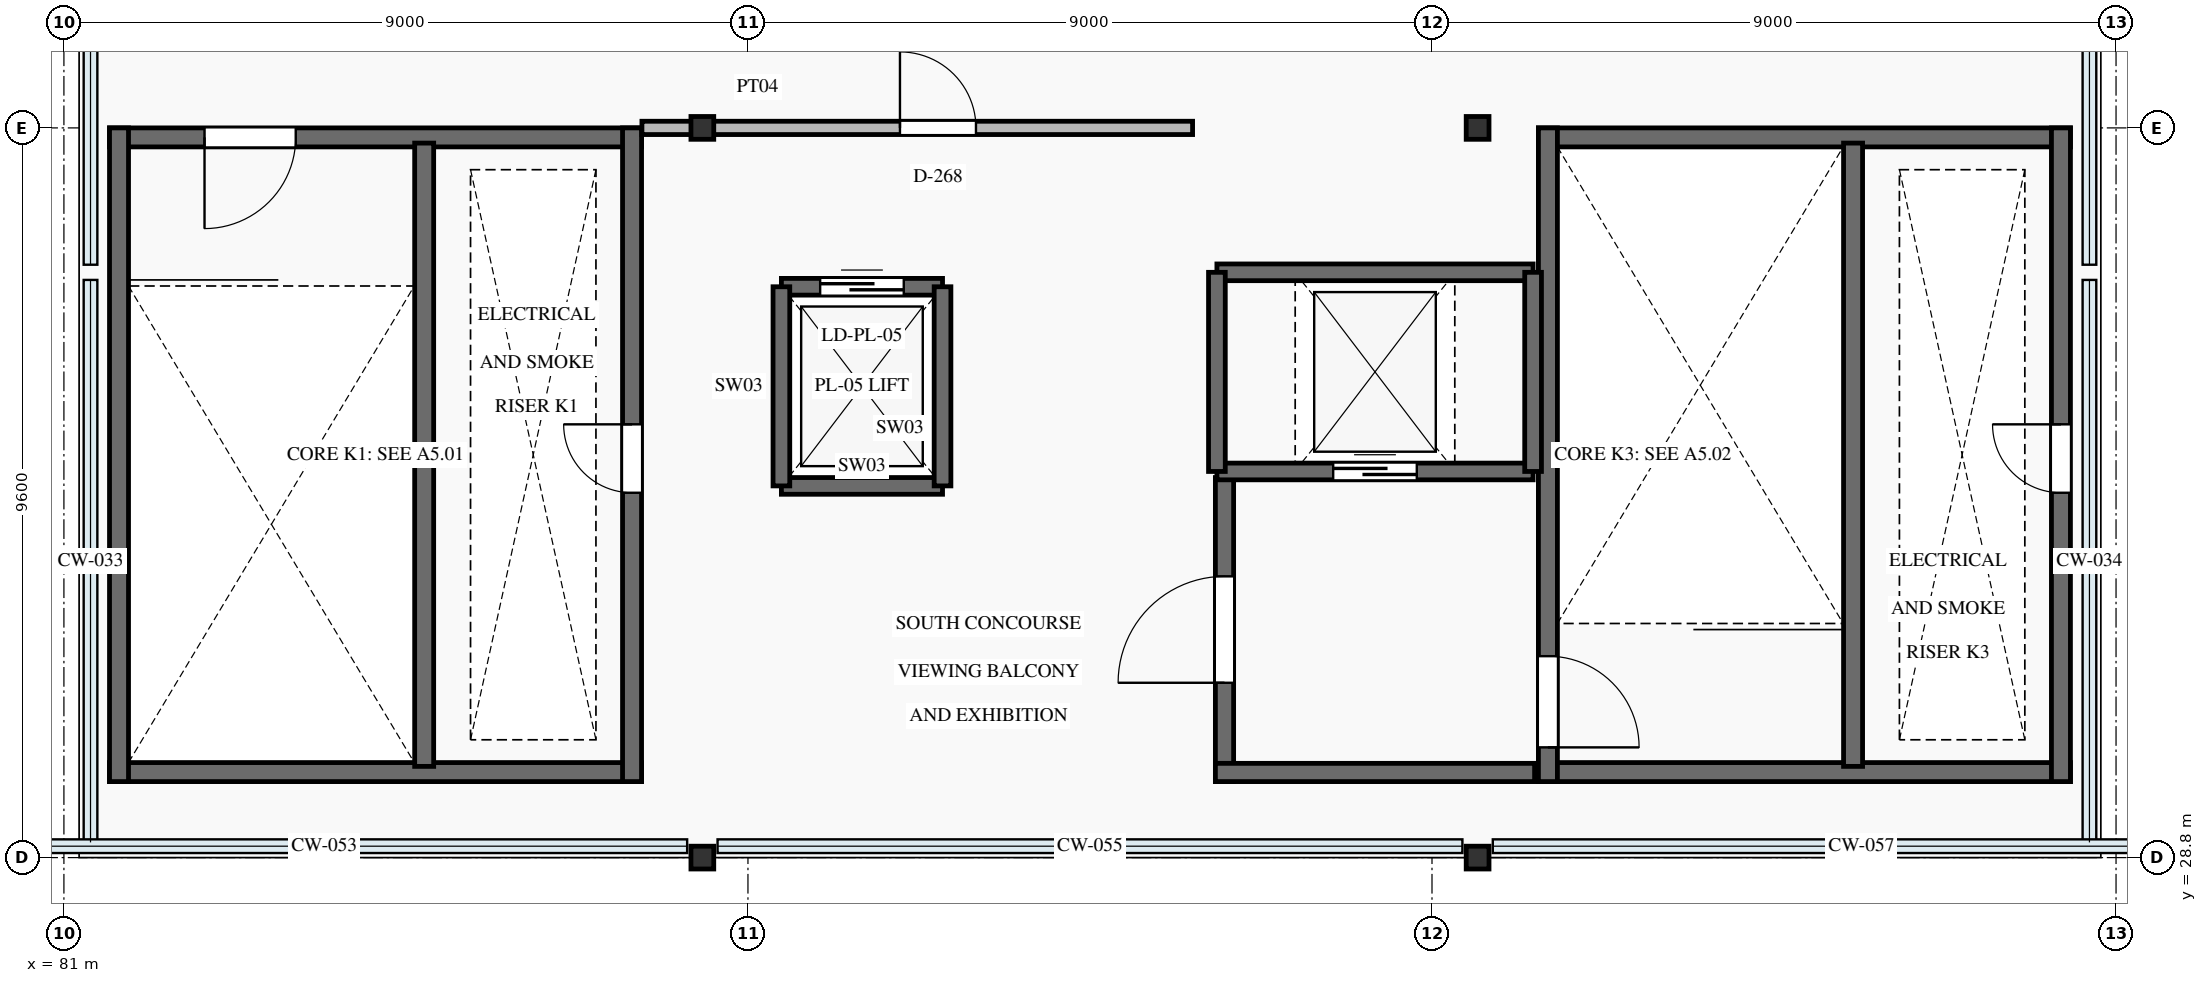
"""IFC4 building model, lengths in metres.
Left out: names, types, materials, properties, quantities, classifications, styles, units other than length and angle.
Written with IfcOpenShell. Run it as: python <this file> out.ifc"""

import sys

from ifc_helpers import new_model, si_unit, direction, frame, frame_2d, origin, origin_2d, place, context, subcontext, project, spatial, rectangle, i_section, extrude, element, fill, save


model = new_model("IFC4")
c1 = context("Model", 3, precision=1e-05, world=origin(), true_north=direction((0.0, 1.0)))
c2 = subcontext(c1, "Body", "Model", "MODEL_VIEW")
j1 = project(units=[si_unit("LENGTHUNIT", "METRE"), si_unit("PLANEANGLEUNIT", "RADIAN")], contexts=[c1])
p1 = place(None, origin())
s1 = spatial("IfcSite", under=j1, at=p1, CompositionType="ELEMENT")
p2 = place(p1, origin())
s2 = spatial("IfcBuilding", under=s1, at=p2, CompositionType="ELEMENT")
p3 = place(p2, frame((0.0, 0.0, 15.0)))
s3 = spatial("IfcBuildingStorey", under=s2, at=p3, CompositionType="ELEMENT", Elevation=15.0)
for number, where, z_axis, x_axis in (
    (1, (89.4, 28.8, 0.0), (0.0, 0.0, 1.0), (1.0, 0.0, 0.0)),
    (2, (89.4, 38.4, 0.0), (0.0, 0.0, 1.0), (1.0, 0.0, 0.0)),
    (3, (99.6, 28.8, 0.0), (0.0, 0.0, 1.0), (1.0, 0.0, 0.0)),
    (4, (99.6, 38.4, 0.0), (0.0, 0.0, 1.0), (1.0, 0.0, 0.0)),
):
    element("IfcColumn", number, at=place(p3, frame(where, z_axis=z_axis, x_axis=x_axis)), inside=s3, PredefinedType="COLUMN", context=c2, shape_type="SweptSolid", body=[
        extrude(i_section(OverallWidth=0.3, OverallDepth=0.3, WebThickness=0.011, FlangeThickness=0.019, FilletRadius=0.027, at=origin_2d()), origin(), (0.0, 0.0, 1.0), 3.9),
    ])
p4 = place(p3, frame((81.6, 29.925, 0.0), z_axis=(0.0, 0.0, 1.0), x_axis=(1.0, 0.0, 0.0)))
e5 = element("IfcWall", 5, at=p4, inside=s3, PredefinedType="SHEAR", context=c2, shape_type="SweptSolid", body=[
    extrude(rectangle(XDim=7.0, YDim=0.25, at=frame_2d((3.5, 0.0))), origin(), (0.0, 0.0, 1.0), 3.9),
])
p5 = place(p3, frame((81.6, 38.275, 0.0), z_axis=(0.0, 0.0, 1.0), x_axis=(1.0, 0.0, 0.0)))
e6 = element("IfcWall", 6, at=p5, inside=s3, PredefinedType="SHEAR", context=c2, shape_type="SweptSolid", body=[
    extrude(rectangle(XDim=7.0, YDim=0.25, at=frame_2d((3.5, 0.0))), origin(), (0.0, 0.0, 1.0), 3.9),
])
p6 = place(p5, frame((1.25, 0.0, 0.0)))
e7 = element("IfcOpeningElement", 7, at=p6, cuts=e6, PredefinedType="OPENING", context=c2, shape_type="SweptSolid", body=[
    extrude(rectangle(XDim=1.2, YDim=2.15, at=frame_2d((0.6, 1.075))), frame((0.0, 0.14, 0.0), z_axis=(0.0, -1.0, 0.0), x_axis=(1.0, 0.0, 0.0)), (0.0, 0.0, 1.0), 0.28),
])
p7 = place(p3, frame((81.725, 29.8, 0.0), z_axis=(0.0, 0.0, 1.0), x_axis=(0.0, 1.0, 0.0)))
e8 = element("IfcWall", 8, at=p7, inside=s3, PredefinedType="SHEAR", context=c2, shape_type="SweptSolid", body=[
    extrude(rectangle(XDim=8.6, YDim=0.25, at=frame_2d((4.3, 0.0))), origin(), (0.0, 0.0, 1.0), 3.9),
])
p8 = place(p3, frame((88.475, 29.8, 0.0), z_axis=(0.0, 0.0, 1.0), x_axis=(0.0, 1.0, 0.0)))
e9 = element("IfcWall", 9, at=p8, inside=s3, PredefinedType="SHEAR", context=c2, shape_type="SweptSolid", body=[
    extrude(rectangle(XDim=8.6, YDim=0.25, at=frame_2d((4.3, 0.0))), origin(), (0.0, 0.0, 1.0), 3.9),
])
p9 = place(p8, frame((3.8, 0.0, 0.0)))
e10 = element("IfcOpeningElement", 10, at=p9, cuts=e9, PredefinedType="OPENING", context=c2, shape_type="SweptSolid", body=[
    extrude(rectangle(XDim=0.9, YDim=2.05, at=frame_2d((0.45, 1.025))), frame((0.0, 0.14, 0.0), z_axis=(0.0, -1.0, 0.0), x_axis=(1.0, 0.0, 0.0)), (0.0, 0.0, 1.0), 0.28),
])
p10 = place(p3, frame((85.74, 30.0, 0.0), z_axis=(0.0, 0.0, 1.0), x_axis=(0.0, 1.0, 0.0)))
e11 = element("IfcWall", 11, at=p10, inside=s3, PredefinedType="SHEAR", context=c2, shape_type="SweptSolid", body=[
    extrude(rectangle(XDim=8.2, YDim=0.25, at=frame_2d((4.1, 0.0))), origin(), (0.0, 0.0, 1.0), 3.9),
])
for number, where, z_axis, x_axis in (
    (12, (100.4, 29.925, 0.0), (0.0, 0.0, 1.0), (1.0, 0.0, 0.0)),
    (13, (100.4, 38.275, 0.0), (0.0, 0.0, 1.0), (1.0, 0.0, 0.0)),
):
    element("IfcWall", number, at=place(p3, frame(where, z_axis=z_axis, x_axis=x_axis)), inside=s3, PredefinedType="SHEAR", context=c2, shape_type="SweptSolid", body=[
        extrude(rectangle(XDim=7.0, YDim=0.25, at=frame_2d((3.5, 0.0))), origin(), (0.0, 0.0, 1.0), 3.9),
    ])
p11 = place(p3, frame((100.525, 29.8, 0.0), z_axis=(0.0, 0.0, 1.0), x_axis=(0.0, 1.0, 0.0)))
e14 = element("IfcWall", 14, at=p11, inside=s3, PredefinedType="SHEAR", context=c2, shape_type="SweptSolid", body=[
    extrude(rectangle(XDim=8.6, YDim=0.25, at=frame_2d((4.3, 0.0))), origin(), (0.0, 0.0, 1.0), 3.9),
])
p12 = place(p11, frame((0.45, 0.0, 0.0)))
e15 = element("IfcOpeningElement", 15, at=p12, cuts=e14, PredefinedType="OPENING", context=c2, shape_type="SweptSolid", body=[
    extrude(rectangle(XDim=1.2, YDim=2.15, at=frame_2d((0.6, 1.075))), frame((0.0, 0.14, 0.0), z_axis=(0.0, -1.0, 0.0), x_axis=(1.0, 0.0, 0.0)), (0.0, 0.0, 1.0), 0.28),
])
p13 = place(p3, frame((107.275, 29.8, 0.0), z_axis=(0.0, 0.0, 1.0), x_axis=(0.0, 1.0, 0.0)))
e16 = element("IfcWall", 16, at=p13, inside=s3, PredefinedType="SHEAR", context=c2, shape_type="SweptSolid", body=[
    extrude(rectangle(XDim=8.6, YDim=0.25, at=frame_2d((4.3, 0.0))), origin(), (0.0, 0.0, 1.0), 3.9),
])
p14 = place(p13, frame((3.8, 0.0, 0.0)))
e17 = element("IfcOpeningElement", 17, at=p14, cuts=e16, PredefinedType="OPENING", context=c2, shape_type="SweptSolid", body=[
    extrude(rectangle(XDim=0.9, YDim=2.05, at=frame_2d((0.45, 1.025))), frame((0.0, 0.14, 0.0), z_axis=(0.0, -1.0, 0.0), x_axis=(1.0, 0.0, 0.0)), (0.0, 0.0, 1.0), 0.28),
])
p15 = place(p3, frame((104.54, 30.0, 0.0), z_axis=(0.0, 0.0, 1.0), x_axis=(0.0, 1.0, 0.0)))
e18 = element("IfcWall", 18, at=p15, inside=s3, PredefinedType="SHEAR", context=c2, shape_type="SweptSolid", body=[
    extrude(rectangle(XDim=8.2, YDim=0.25, at=frame_2d((4.1, 0.0))), origin(), (0.0, 0.0, 1.0), 3.9),
])
p16 = place(p3, frame((96.27, 29.8, 0.0), z_axis=(0.0, 0.0, 1.0), x_axis=(0.0, 1.0, 0.0)))
e19 = element("IfcWall", 19, at=p16, inside=s3, PredefinedType="SHEAR", context=c2, shape_type="SweptSolid", body=[
    extrude(rectangle(XDim=4.0, YDim=0.24, at=frame_2d((2.0, 0.0))), origin(), (0.0, 0.0, 1.0), 3.9),
])
p17 = place(p16, frame((1.3, 0.0, 0.0)))
e20 = element("IfcOpeningElement", 20, at=p17, cuts=e19, PredefinedType="OPENING", context=c2, shape_type="SweptSolid", body=[
    extrude(rectangle(XDim=1.4, YDim=2.2, at=frame_2d((0.7, 1.1))), frame((0.0, 0.135, 0.0), z_axis=(0.0, -1.0, 0.0), x_axis=(1.0, 0.0, 0.0)), (0.0, 0.0, 1.0), 0.27),
])
p18 = place(p3, frame((96.15, 29.92, 0.0), z_axis=(0.0, 0.0, 1.0), x_axis=(1.0, 0.0, 0.0)))
e21 = element("IfcWall", 21, at=p18, inside=s3, PredefinedType="SHEAR", context=c2, shape_type="SweptSolid", body=[
    extrude(rectangle(XDim=4.2, YDim=0.24, at=frame_2d((2.1, 0.0))), origin(), (0.0, 0.0, 1.0), 3.9),
])
p19 = place(p3, frame((90.44, 33.69, 0.0), z_axis=(0.0, 0.0, 1.0), x_axis=(1.0, 0.0, 0.0)))
e22 = element("IfcWall", 22, at=p19, inside=s3, PredefinedType="SHEAR", context=c2, shape_type="SweptSolid", body=[
    extrude(rectangle(XDim=2.12, YDim=0.22, at=frame_2d((1.06, 0.0))), origin(), (0.0, 0.0, 1.0), 3.9),
])
p20 = place(p3, frame((90.44, 36.31, 0.0), z_axis=(0.0, 0.0, 1.0), x_axis=(1.0, 0.0, 0.0)))
e23 = element("IfcWall", 23, at=p20, inside=s3, PredefinedType="SHEAR", context=c2, shape_type="SweptSolid", body=[
    extrude(rectangle(XDim=2.12, YDim=0.22, at=frame_2d((1.06, 0.0))), origin(), (0.0, 0.0, 1.0), 3.9),
])
p21 = place(p20, frame((0.51, 0.0, 0.0)))
e24 = element("IfcOpeningElement", 24, at=p21, cuts=e23, PredefinedType="OPENING", context=c2, shape_type="SweptSolid", body=[
    extrude(rectangle(XDim=1.1, YDim=2.15, at=frame_2d((0.55, 1.075))), frame((0.0, 0.125, 0.0), z_axis=(0.0, -1.0, 0.0), x_axis=(1.0, 0.0, 0.0)), (0.0, 0.0, 1.0), 0.25),
])
for number, where, z_axis, x_axis in (
    (25, (90.44, 33.69, 0.0), (0.0, 0.0, 1.0), (0.0, 1.0, 0.0)),
    (26, (92.56, 33.69, 0.0), (0.0, 0.0, 1.0), (0.0, 1.0, 0.0)),
):
    element("IfcWall", number, at=place(p3, frame(where, z_axis=z_axis, x_axis=x_axis)), inside=s3, PredefinedType="SHEAR", context=c2, shape_type="SweptSolid", body=[
        extrude(rectangle(XDim=2.62, YDim=0.22, at=frame_2d((1.31, 0.0))), origin(), (0.0, 0.0, 1.0), 3.9),
    ])
p22 = place(p3, frame((96.17, 33.88, 0.0), z_axis=(0.0, 0.0, 1.0), x_axis=(1.0, 0.0, 0.0)))
e27 = element("IfcWall", 27, at=p22, inside=s3, PredefinedType="SHEAR", context=c2, shape_type="SweptSolid", body=[
    extrude(rectangle(XDim=4.16, YDim=0.22, at=frame_2d((2.08, 0.0))), origin(), (0.0, 0.0, 1.0), 3.9),
])
p23 = place(p22, frame((1.53, 0.0, 0.0)))
e28 = element("IfcOpeningElement", 28, at=p23, cuts=e27, PredefinedType="OPENING", context=c2, shape_type="SweptSolid", body=[
    extrude(rectangle(XDim=1.1, YDim=2.15, at=frame_2d((0.55, 1.075))), frame((0.0, 0.125, 0.0), z_axis=(0.0, -1.0, 0.0), x_axis=(1.0, 0.0, 0.0)), (0.0, 0.0, 1.0), 0.25),
])
p24 = place(p3, frame((96.17, 36.5, 0.0), z_axis=(0.0, 0.0, 1.0), x_axis=(1.0, 0.0, 0.0)))
e29 = element("IfcWall", 29, at=p24, inside=s3, PredefinedType="SHEAR", context=c2, shape_type="SweptSolid", body=[
    extrude(rectangle(XDim=4.16, YDim=0.22, at=frame_2d((2.08, 0.0))), origin(), (0.0, 0.0, 1.0), 3.9),
])
for number, where, z_axis, x_axis in (
    (30, (96.17, 33.88, 0.0), (0.0, 0.0, 1.0), (0.0, 1.0, 0.0)),
    (31, (100.33, 33.88, 0.0), (0.0, 0.0, 1.0), (0.0, 1.0, 0.0)),
):
    element("IfcWall", number, at=place(p3, frame(where, z_axis=z_axis, x_axis=x_axis)), inside=s3, PredefinedType="SHEAR", context=c2, shape_type="SweptSolid", body=[
        extrude(rectangle(XDim=2.62, YDim=0.22, at=frame_2d((1.31, 0.0))), origin(), (0.0, 0.0, 1.0), 3.9),
    ])
p25 = place(p3, frame((88.605, 38.4, 0.0), z_axis=(0.0, 0.0, 1.0), x_axis=(1.0, 0.0, 0.0)))
e32 = element("IfcWall", 32, at=p25, inside=s3, PredefinedType="PARTITIONING", context=c2, shape_type="SweptSolid", body=[
    extrude(rectangle(XDim=7.245, YDim=0.175, at=frame_2d((3.623, 0.0))), origin(), (0.0, 0.0, 1.0), 3.64),
])
p26 = place(p25, frame((3.395, 0.0, 0.0)))
e33 = element("IfcOpeningElement", 33, at=p26, cuts=e32, PredefinedType="OPENING", context=c2, shape_type="SweptSolid", body=[
    extrude(rectangle(XDim=1.0, YDim=2.15, at=frame_2d((0.5, 1.075))), frame((0.0, 0.103, 0.0), z_axis=(0.0, -1.0, 0.0), x_axis=(1.0, 0.0, 0.0)), (0.0, 0.0, 1.0), 0.205),
])
p27 = place(p6, frame((1.2, 0.0, 0.0), z_axis=(0.0, 0.0, 1.0), x_axis=(-1.0, 0.0, 0.0)))
e34 = element("IfcDoor", 34, at=p27, inside=s3, OperationType="SINGLE_SWING_LEFT", PredefinedType="DOOR", context=c2, shape_type="SweptSolid", body=[
    extrude(rectangle(XDim=1.2, YDim=2.15, at=frame_2d((0.6, 1.075))), frame((0.0, 0.025, 0.0), z_axis=(0.0, -1.0, 0.0), x_axis=(1.0, 0.0, 0.0)), (0.0, 0.0, 1.0), 0.05),
])
fill(e7, e34)
p28 = place(p9, origin())
e35 = element("IfcDoor", 35, at=p28, inside=s3, OperationType="SINGLE_SWING_RIGHT", PredefinedType="DOOR", context=c2, shape_type="SweptSolid", body=[
    extrude(rectangle(XDim=0.9, YDim=2.05, at=frame_2d((0.45, 1.025))), frame((0.0, 0.025, 0.0), z_axis=(0.0, -1.0, 0.0), x_axis=(1.0, 0.0, 0.0)), (0.0, 0.0, 1.0), 0.05),
])
fill(e10, e35)
p29 = place(p12, frame((1.2, 0.0, 0.0), z_axis=(0.0, 0.0, 1.0), x_axis=(-1.0, 0.0, 0.0)))
e36 = element("IfcDoor", 36, at=p29, inside=s3, OperationType="SINGLE_SWING_LEFT", PredefinedType="DOOR", context=c2, shape_type="SweptSolid", body=[
    extrude(rectangle(XDim=1.2, YDim=2.15, at=frame_2d((0.6, 1.075))), frame((0.0, 0.025, 0.0), z_axis=(0.0, -1.0, 0.0), x_axis=(1.0, 0.0, 0.0)), (0.0, 0.0, 1.0), 0.05),
])
fill(e15, e36)
p30 = place(p14, origin())
e37 = element("IfcDoor", 37, at=p30, inside=s3, OperationType="SINGLE_SWING_RIGHT", PredefinedType="DOOR", context=c2, shape_type="SweptSolid", body=[
    extrude(rectangle(XDim=0.9, YDim=2.05, at=frame_2d((0.45, 1.025))), frame((0.0, 0.025, 0.0), z_axis=(0.0, -1.0, 0.0), x_axis=(1.0, 0.0, 0.0)), (0.0, 0.0, 1.0), 0.05),
])
fill(e17, e37)
p31 = place(p17, origin())
e38 = element("IfcDoor", 38, at=p31, inside=s3, OperationType="SINGLE_SWING_LEFT", PredefinedType="DOOR", context=c2, shape_type="SweptSolid", body=[
    extrude(rectangle(XDim=1.4, YDim=2.2, at=frame_2d((0.7, 1.1))), frame((0.0, 0.025, 0.0), z_axis=(0.0, -1.0, 0.0), x_axis=(1.0, 0.0, 0.0)), (0.0, 0.0, 1.0), 0.05),
])
fill(e20, e38)
p32 = place(p21, origin())
e39 = element("IfcDoor", 39, at=p32, inside=s3, OperationType="SLIDING_TO_LEFT", PredefinedType="DOOR", context=c2, shape_type="SweptSolid", body=[
    extrude(rectangle(XDim=1.1, YDim=2.15, at=frame_2d((0.55, 1.075))), frame((0.0, 0.025, 0.0), z_axis=(0.0, -1.0, 0.0), x_axis=(1.0, 0.0, 0.0)), (0.0, 0.0, 1.0), 0.05),
])
fill(e24, e39)
p33 = place(p23, origin())
e40 = element("IfcDoor", 40, at=p33, inside=s3, OperationType="SLIDING_TO_RIGHT", PredefinedType="DOOR", context=c2, shape_type="SweptSolid", body=[
    extrude(rectangle(XDim=1.1, YDim=2.15, at=frame_2d((0.55, 1.075))), frame((0.0, 0.025, 0.0), z_axis=(0.0, -1.0, 0.0), x_axis=(1.0, 0.0, 0.0)), (0.0, 0.0, 1.0), 0.05),
])
fill(e28, e40)
p34 = place(p26, origin())
e41 = element("IfcDoor", 41, at=p34, inside=s3, OperationType="SINGLE_SWING_LEFT", PredefinedType="DOOR", context=c2, shape_type="SweptSolid", body=[
    extrude(rectangle(XDim=1.0, YDim=2.15, at=frame_2d((0.5, 1.075))), frame((0.0, 0.025, 0.0), z_axis=(0.0, -1.0, 0.0), x_axis=(1.0, 0.0, 0.0)), (0.0, 0.0, 1.0), 0.05),
])
fill(e33, e41)
save(model, sys.argv[1])
